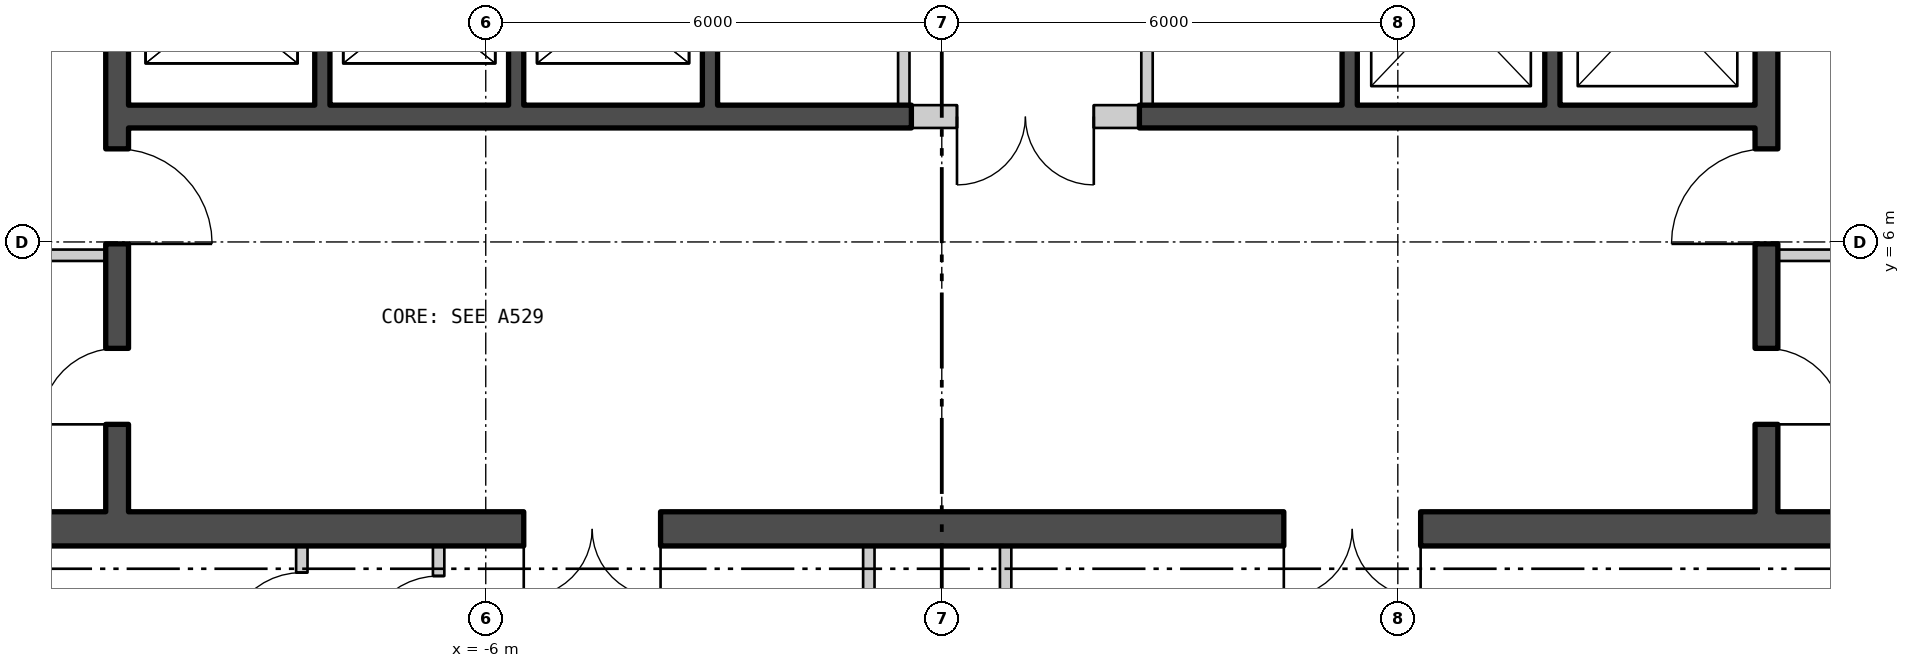
"""IFC4 building model, lengths in metres.
Left out: names, types, materials, properties, quantities, classifications, styles, units other than length and angle.
Written with IfcOpenShell. Run it as: python <this file> out.ifc"""

import sys

from ifc_helpers import new_model, si_unit, direction, frame, frame_2d, origin, place, context, subcontext, project, spatial, polyline, rectangle, outline, extrude, element, fill, save


model = new_model("IFC4")
c1 = context("Model", 3, precision=1e-05, world=origin(), true_north=direction((0.0, 1.0)))
c2 = subcontext(c1, "Body", "Model", "MODEL_VIEW")
j1 = project(units=[si_unit("LENGTHUNIT", "METRE"), si_unit("PLANEANGLEUNIT", "RADIAN")], contexts=[c1])
p1 = place(None, origin())
s1 = spatial("IfcSite", under=j1, at=p1, CompositionType="ELEMENT")
p2 = place(p1, origin())
s2 = spatial("IfcBuilding", under=s1, at=p2, CompositionType="ELEMENT")
p3 = place(p2, frame((0.0, 0.0, 239.4)))
s3 = spatial("IfcBuildingStorey", under=s2, at=p3, CompositionType="ELEMENT", Elevation=239.4)
p4 = place(p3, frame((-25.975, 14.597, -0.18), z_axis=(0.0, 0.0, 1.0), x_axis=(0.499999764979, -0.866025539474, 0.0)))
e1 = element("IfcWall", 1, at=p4, inside=s3, PredefinedType="SOLIDWALL", context=c2, shape_type="SweptSolid", body=[
    extrude(outline(polyline([(-0.13, -0.225), (45.87, -0.225), (45.61, 0.225), (0.13, 0.225), (-0.13, -0.225)])), origin(), (0.0, 0.0, 1.0), 6.0),
])
p5 = place(p4, frame((1.424, 0.0, 1.38)))
e2 = element("IfcOpeningElement", 2, at=p5, cuts=e1, PredefinedType="OPENING", context=c2, shape_type="SweptSolid", body=[
    extrude(rectangle(XDim=2.4, YDim=3.6, at=frame_2d((1.2, 1.8))), frame((0.0, 0.235, 0.0), z_axis=(0.0, -1.0, 0.0), x_axis=(1.0, 0.0, 0.0)), (0.0, 0.0, 1.0), 0.47),
])
p6 = place(p4, frame((5.893, 0.0, 1.38)))
e3 = element("IfcOpeningElement", 3, at=p6, cuts=e1, PredefinedType="OPENING", context=c2, shape_type="SweptSolid", body=[
    extrude(rectangle(XDim=2.4, YDim=3.6, at=frame_2d((1.2, 1.8))), frame((0.0, 0.235, 0.0), z_axis=(0.0, -1.0, 0.0), x_axis=(1.0, 0.0, 0.0)), (0.0, 0.0, 1.0), 0.47),
])
p7 = place(p4, frame((10.401, 0.0, 1.38)))
e4 = element("IfcOpeningElement", 4, at=p7, cuts=e1, PredefinedType="OPENING", context=c2, shape_type="SweptSolid", body=[
    extrude(rectangle(XDim=2.4, YDim=3.6, at=frame_2d((1.2, 1.8))), frame((0.0, 0.235, 0.0), z_axis=(0.0, -1.0, 0.0), x_axis=(1.0, 0.0, 0.0)), (0.0, 0.0, 1.0), 0.47),
])
p8 = place(p4, frame((14.909, 0.0, 1.38)))
e5 = element("IfcOpeningElement", 5, at=p8, cuts=e1, PredefinedType="OPENING", context=c2, shape_type="SweptSolid", body=[
    extrude(rectangle(XDim=2.4, YDim=3.6, at=frame_2d((1.2, 1.8))), frame((0.0, 0.235, 0.0), z_axis=(0.0, -1.0, 0.0), x_axis=(1.0, 0.0, 0.0)), (0.0, 0.0, 1.0), 0.47),
])
p9 = place(p4, frame((19.416, 0.0, 1.38)))
e6 = element("IfcOpeningElement", 6, at=p9, cuts=e1, PredefinedType="OPENING", context=c2, shape_type="SweptSolid", body=[
    extrude(rectangle(XDim=2.4, YDim=3.6, at=frame_2d((1.2, 1.8))), frame((0.0, 0.235, 0.0), z_axis=(0.0, -1.0, 0.0), x_axis=(1.0, 0.0, 0.0)), (0.0, 0.0, 1.0), 0.47),
])
p10 = place(p4, frame((23.924, 0.0, 1.38)))
e7 = element("IfcOpeningElement", 7, at=p10, cuts=e1, PredefinedType="OPENING", context=c2, shape_type="SweptSolid", body=[
    extrude(rectangle(XDim=2.4, YDim=3.6, at=frame_2d((1.2, 1.8))), frame((0.0, 0.235, 0.0), z_axis=(0.0, -1.0, 0.0), x_axis=(1.0, 0.0, 0.0)), (0.0, 0.0, 1.0), 0.47),
])
p11 = place(p4, frame((28.431, 0.0, 1.38)))
e8 = element("IfcOpeningElement", 8, at=p11, cuts=e1, PredefinedType="OPENING", context=c2, shape_type="SweptSolid", body=[
    extrude(rectangle(XDim=2.4, YDim=3.6, at=frame_2d((1.2, 1.8))), frame((0.0, 0.235, 0.0), z_axis=(0.0, -1.0, 0.0), x_axis=(1.0, 0.0, 0.0)), (0.0, 0.0, 1.0), 0.47),
])
p12 = place(p4, frame((32.939, 0.0, 1.38)))
e9 = element("IfcOpeningElement", 9, at=p12, cuts=e1, PredefinedType="OPENING", context=c2, shape_type="SweptSolid", body=[
    extrude(rectangle(XDim=2.4, YDim=3.6, at=frame_2d((1.2, 1.8))), frame((0.0, 0.235, 0.0), z_axis=(0.0, -1.0, 0.0), x_axis=(1.0, 0.0, 0.0)), (0.0, 0.0, 1.0), 0.47),
])
p13 = place(p4, frame((37.447, 0.0, 1.38)))
e10 = element("IfcOpeningElement", 10, at=p13, cuts=e1, PredefinedType="OPENING", context=c2, shape_type="SweptSolid", body=[
    extrude(rectangle(XDim=2.4, YDim=3.6, at=frame_2d((1.2, 1.8))), frame((0.0, 0.235, 0.0), z_axis=(0.0, -1.0, 0.0), x_axis=(1.0, 0.0, 0.0)), (0.0, 0.0, 1.0), 0.47),
])
p14 = place(p4, frame((41.916, 0.0, 1.38)))
e11 = element("IfcOpeningElement", 11, at=p14, cuts=e1, PredefinedType="OPENING", context=c2, shape_type="SweptSolid", body=[
    extrude(rectangle(XDim=2.4, YDim=3.6, at=frame_2d((1.2, 1.8))), frame((0.0, 0.235, 0.0), z_axis=(0.0, -1.0, 0.0), x_axis=(1.0, 0.0, 0.0)), (0.0, 0.0, 1.0), 0.47),
])
p15 = place(p3, frame((3.105, -25.015, -0.18), z_axis=(0.0, 0.0, 1.0), x_axis=(0.499999764979, 0.866025539474, 0.0)))
e12 = element("IfcWall", 12, at=p15, inside=s3, PredefinedType="SOLIDWALL", context=c2, shape_type="SweptSolid", body=[
    extrude(outline(polyline([(-0.13, -0.225), (45.87, -0.225), (45.61, 0.225), (0.13, 0.225), (-0.13, -0.225)])), origin(), (0.0, 0.0, 1.0), 6.0),
])
p16 = place(p15, frame((1.424, 0.0, 1.38)))
e13 = element("IfcOpeningElement", 13, at=p16, cuts=e12, PredefinedType="OPENING", context=c2, shape_type="SweptSolid", body=[
    extrude(rectangle(XDim=2.4, YDim=3.6, at=frame_2d((1.2, 1.8))), frame((0.0, 0.235, 0.0), z_axis=(0.0, -1.0, 0.0), x_axis=(1.0, 0.0, 0.0)), (0.0, 0.0, 1.0), 0.47),
])
p17 = place(p15, frame((5.893, 0.0, 1.38)))
e14 = element("IfcOpeningElement", 14, at=p17, cuts=e12, PredefinedType="OPENING", context=c2, shape_type="SweptSolid", body=[
    extrude(rectangle(XDim=2.4, YDim=3.6, at=frame_2d((1.2, 1.8))), frame((0.0, 0.235, 0.0), z_axis=(0.0, -1.0, 0.0), x_axis=(1.0, 0.0, 0.0)), (0.0, 0.0, 1.0), 0.47),
])
p18 = place(p15, frame((10.401, 0.0, 1.38)))
e15 = element("IfcOpeningElement", 15, at=p18, cuts=e12, PredefinedType="OPENING", context=c2, shape_type="SweptSolid", body=[
    extrude(rectangle(XDim=2.4, YDim=3.6, at=frame_2d((1.2, 1.8))), frame((0.0, 0.235, 0.0), z_axis=(0.0, -1.0, 0.0), x_axis=(1.0, 0.0, 0.0)), (0.0, 0.0, 1.0), 0.47),
])
p19 = place(p15, frame((14.909, 0.0, 1.38)))
e16 = element("IfcOpeningElement", 16, at=p19, cuts=e12, PredefinedType="OPENING", context=c2, shape_type="SweptSolid", body=[
    extrude(rectangle(XDim=2.4, YDim=3.6, at=frame_2d((1.2, 1.8))), frame((0.0, 0.235, 0.0), z_axis=(0.0, -1.0, 0.0), x_axis=(1.0, 0.0, 0.0)), (0.0, 0.0, 1.0), 0.47),
])
p20 = place(p15, frame((19.416, 0.0, 1.38)))
e17 = element("IfcOpeningElement", 17, at=p20, cuts=e12, PredefinedType="OPENING", context=c2, shape_type="SweptSolid", body=[
    extrude(rectangle(XDim=2.4, YDim=3.6, at=frame_2d((1.2, 1.8))), frame((0.0, 0.235, 0.0), z_axis=(0.0, -1.0, 0.0), x_axis=(1.0, 0.0, 0.0)), (0.0, 0.0, 1.0), 0.47),
])
p21 = place(p15, frame((23.924, 0.0, 1.38)))
e18 = element("IfcOpeningElement", 18, at=p21, cuts=e12, PredefinedType="OPENING", context=c2, shape_type="SweptSolid", body=[
    extrude(rectangle(XDim=2.4, YDim=3.6, at=frame_2d((1.2, 1.8))), frame((0.0, 0.235, 0.0), z_axis=(0.0, -1.0, 0.0), x_axis=(1.0, 0.0, 0.0)), (0.0, 0.0, 1.0), 0.47),
])
p22 = place(p15, frame((28.431, 0.0, 1.38)))
e19 = element("IfcOpeningElement", 19, at=p22, cuts=e12, PredefinedType="OPENING", context=c2, shape_type="SweptSolid", body=[
    extrude(rectangle(XDim=2.4, YDim=3.6, at=frame_2d((1.2, 1.8))), frame((0.0, 0.235, 0.0), z_axis=(0.0, -1.0, 0.0), x_axis=(1.0, 0.0, 0.0)), (0.0, 0.0, 1.0), 0.47),
])
p23 = place(p15, frame((32.939, 0.0, 1.38)))
e20 = element("IfcOpeningElement", 20, at=p23, cuts=e12, PredefinedType="OPENING", context=c2, shape_type="SweptSolid", body=[
    extrude(rectangle(XDim=2.4, YDim=3.6, at=frame_2d((1.2, 1.8))), frame((0.0, 0.235, 0.0), z_axis=(0.0, -1.0, 0.0), x_axis=(1.0, 0.0, 0.0)), (0.0, 0.0, 1.0), 0.47),
])
p24 = place(p15, frame((37.447, 0.0, 1.38)))
e21 = element("IfcOpeningElement", 21, at=p24, cuts=e12, PredefinedType="OPENING", context=c2, shape_type="SweptSolid", body=[
    extrude(rectangle(XDim=2.4, YDim=3.6, at=frame_2d((1.2, 1.8))), frame((0.0, 0.235, 0.0), z_axis=(0.0, -1.0, 0.0), x_axis=(1.0, 0.0, 0.0)), (0.0, 0.0, 1.0), 0.47),
])
p25 = place(p15, frame((41.916, 0.0, 1.38)))
e22 = element("IfcOpeningElement", 22, at=p25, cuts=e12, PredefinedType="OPENING", context=c2, shape_type="SweptSolid", body=[
    extrude(rectangle(XDim=2.4, YDim=3.6, at=frame_2d((1.2, 1.8))), frame((0.0, 0.235, 0.0), z_axis=(0.0, -1.0, 0.0), x_axis=(1.0, 0.0, 0.0)), (0.0, 0.0, 1.0), 0.47),
])
p26 = place(p3, frame((-16.2, 2.225, 0.0), z_axis=(0.0, 0.0, 1.0), x_axis=(1.0, 0.0, 0.0)))
e23 = element("IfcWall", 23, at=p26, inside=s3, PredefinedType="SHEAR", context=c2, shape_type="SweptSolid", body=[
    extrude(rectangle(XDim=32.4, YDim=0.45, at=frame_2d((16.2, 0.0))), origin(), (0.0, 0.0, 1.0), 5.8),
])
p27 = place(p26, frame((10.7, 0.0, 0.0)))
e24 = element("IfcOpeningElement", 24, at=p27, cuts=e23, PredefinedType="OPENING", context=c2, shape_type="SweptSolid", body=[
    extrude(rectangle(XDim=1.8, YDim=2.4, at=frame_2d((0.9, 1.2))), frame((0.0, 0.235, 0.0), z_axis=(0.0, -1.0, 0.0), x_axis=(1.0, 0.0, 0.0)), (0.0, 0.0, 1.0), 0.47),
])
p28 = place(p26, frame((20.7, 0.0, 0.0)))
e25 = element("IfcOpeningElement", 25, at=p28, cuts=e23, PredefinedType="OPENING", context=c2, shape_type="SweptSolid", body=[
    extrude(rectangle(XDim=1.8, YDim=2.4, at=frame_2d((0.9, 1.2))), frame((0.0, 0.235, 0.0), z_axis=(0.0, -1.0, 0.0), x_axis=(1.0, 0.0, 0.0)), (0.0, 0.0, 1.0), 0.47),
])
p29 = place(p3, frame((-10.85, 2.45, 0.0), z_axis=(0.0, 0.0, 1.0), x_axis=(0.0, 1.0, 0.0)))
e26 = element("IfcWall", 26, at=p29, inside=s3, PredefinedType="SHEAR", context=c2, shape_type="SweptSolid", body=[
    extrude(rectangle(XDim=15.1, YDim=0.3, at=frame_2d((7.55, 0.0))), origin(), (0.0, 0.0, 1.0), 5.8),
])
p30 = place(p29, frame((3.525, 0.0, 0.0)))
e27 = element("IfcOpeningElement", 27, at=p30, cuts=e26, PredefinedType="OPENING", context=c2, shape_type="SweptSolid", body=[
    extrude(rectangle(XDim=1.25, YDim=2.1, at=frame_2d((0.625, 1.05))), frame((0.0, 0.16, 0.0), z_axis=(0.0, -1.0, 0.0), x_axis=(1.0, 0.0, 0.0)), (0.0, 0.0, 1.0), 0.32),
])
p31 = place(p29, frame((1.15, 0.0, 0.0)))
e28 = element("IfcOpeningElement", 28, at=p31, cuts=e26, PredefinedType="OPENING", context=c2, shape_type="SweptSolid", body=[
    extrude(rectangle(XDim=1.0, YDim=2.1, at=frame_2d((0.5, 1.05))), frame((0.0, 0.16, 0.0), z_axis=(0.0, -1.0, 0.0), x_axis=(1.0, 0.0, 0.0)), (0.0, 0.0, 1.0), 0.32),
])
p32 = place(p3, frame((10.85, 2.45, 0.0), z_axis=(0.0, 0.0, 1.0), x_axis=(0.0, 1.0, 0.0)))
e29 = element("IfcWall", 29, at=p32, inside=s3, PredefinedType="SHEAR", context=c2, shape_type="SweptSolid", body=[
    extrude(rectangle(XDim=15.1, YDim=0.3, at=frame_2d((7.55, 0.0))), origin(), (0.0, 0.0, 1.0), 5.8),
])
p33 = place(p32, frame((3.525, 0.0, 0.0)))
e30 = element("IfcOpeningElement", 30, at=p33, cuts=e29, PredefinedType="OPENING", context=c2, shape_type="SweptSolid", body=[
    extrude(rectangle(XDim=1.25, YDim=2.1, at=frame_2d((0.625, 1.05))), frame((0.0, 0.16, 0.0), z_axis=(0.0, -1.0, 0.0), x_axis=(1.0, 0.0, 0.0)), (0.0, 0.0, 1.0), 0.32),
])
p34 = place(p32, frame((1.15, 0.0, 0.0)))
e31 = element("IfcOpeningElement", 31, at=p34, cuts=e29, PredefinedType="OPENING", context=c2, shape_type="SweptSolid", body=[
    extrude(rectangle(XDim=1.0, YDim=2.1, at=frame_2d((0.5, 1.05))), frame((0.0, 0.16, 0.0), z_axis=(0.0, -1.0, 0.0), x_axis=(1.0, 0.0, 0.0)), (0.0, 0.0, 1.0), 0.32),
])
p35 = place(p3, frame((-10.7, 7.65, 0.0), z_axis=(0.0, 0.0, 1.0), x_axis=(1.0, 0.0, 0.0)))
e32 = element("IfcWall", 32, at=p35, inside=s3, PredefinedType="SHEAR", context=c2, shape_type="SweptSolid", body=[
    extrude(rectangle(XDim=10.3, YDim=0.3, at=frame_2d((5.15, 0.0))), origin(), (0.0, 0.0, 1.0), 5.8),
])
p36 = place(p3, frame((2.6, 7.65, 0.0), z_axis=(0.0, 0.0, 1.0), x_axis=(1.0, 0.0, 0.0)))
e33 = element("IfcWall", 33, at=p36, inside=s3, PredefinedType="SHEAR", context=c2, shape_type="SweptSolid", body=[
    extrude(rectangle(XDim=8.1, YDim=0.3, at=frame_2d((4.05, 0.0))), origin(), (0.0, 0.0, 1.0), 5.8),
])
for number, where, z_axis, x_axis in (
    (34, (-8.15, 7.8, 0.0), (0.0, 0.0, 1.0), (0.0, 1.0, 0.0)),
    (35, (-5.6, 7.8, 0.0), (0.0, 0.0, 1.0), (0.0, 1.0, 0.0)),
    (36, (-3.05, 7.8, 0.0), (0.0, 0.0, 1.0), (0.0, 1.0, 0.0)),
):
    element("IfcWall", number, at=place(p3, frame(where, z_axis=z_axis, x_axis=x_axis)), inside=s3, PredefinedType="SHEAR", context=c2, shape_type="SweptSolid", body=[
        extrude(rectangle(XDim=2.7, YDim=0.2, at=frame_2d((1.35, 0.0))), origin(), (0.0, 0.0, 1.0), 5.8),
    ])
for number, where, z_axis, x_axis in (
    (37, (-0.5, 7.8, 0.0), (0.0, 0.0, 1.0), (0.0, 1.0, 0.0)),
    (38, (2.7, 7.8, 0.0), (0.0, 0.0, 1.0), (0.0, 1.0, 0.0)),
):
    element("IfcWall", number, at=place(p3, frame(where, z_axis=z_axis, x_axis=x_axis)), inside=s3, PredefinedType="PARTITIONING", context=c2, shape_type="SweptSolid", body=[
        extrude(rectangle(XDim=2.7, YDim=0.15, at=frame_2d((1.35, 0.0))), origin(), (0.0, 0.0, 1.0), 5.8),
    ])
for number, where, z_axis, x_axis in (
    (39, (5.367, 7.8, 0.0), (0.0, 0.0, 1.0), (0.0, 1.0, 0.0)),
    (40, (8.033, 7.8, 0.0), (0.0, 0.0, 1.0), (0.0, 1.0, 0.0)),
):
    element("IfcWall", number, at=place(p3, frame(where, z_axis=z_axis, x_axis=x_axis)), inside=s3, PredefinedType="SHEAR", context=c2, shape_type="SweptSolid", body=[
        extrude(rectangle(XDim=2.7, YDim=0.2, at=frame_2d((1.35, 0.0))), origin(), (0.0, 0.0, 1.0), 5.8),
    ])
for number, where, z_axis, x_axis in (
    (41, (-14.2, 5.825, 0.0), (0.0, 0.0, 1.0), (1.0, 0.0, 0.0)),
    (42, (11.0, 5.825, 0.0), (0.0, 0.0, 1.0), (1.0, 0.0, 0.0)),
):
    element("IfcWall", number, at=place(p3, frame(where, z_axis=z_axis, x_axis=x_axis)), inside=s3, PredefinedType="PARTITIONING", context=c2, shape_type="SweptSolid", body=[
        extrude(rectangle(XDim=3.2, YDim=0.15, at=frame_2d((1.6, 0.0))), origin(), (0.0, 0.0, 1.0), 5.8),
    ])
p37 = place(p3, frame((-0.4, 7.65, 0.0), z_axis=(0.0, 0.0, 1.0), x_axis=(1.0, 0.0, 0.0)))
e43 = element("IfcWall", 43, at=p37, inside=s3, PredefinedType="PARTITIONING", context=c2, shape_type="SweptSolid", body=[
    extrude(rectangle(XDim=3.0, YDim=0.3, at=frame_2d((1.5, 0.0))), origin(), (0.0, 0.0, 1.0), 5.8),
])
p38 = place(p37, frame((0.6, 0.0, 0.0)))
e44 = element("IfcOpeningElement", 44, at=p38, cuts=e43, PredefinedType="OPENING", context=c2, shape_type="SweptSolid", body=[
    extrude(rectangle(XDim=1.8, YDim=2.4, at=frame_2d((0.9, 1.2))), frame((0.0, 0.16, 0.0), z_axis=(0.0, -1.0, 0.0), x_axis=(1.0, 0.0, 0.0)), (0.0, 0.0, 1.0), 0.32),
])
p39 = place(p3, frame((-8.42, 0.3, 0.0), z_axis=(0.0, 0.0, 1.0), x_axis=(0.0, 1.0, 0.0)))
e45 = element("IfcWall", 45, at=p39, inside=s3, PredefinedType="PARTITIONING", context=c2, shape_type="SweptSolid", body=[
    extrude(rectangle(XDim=1.7, YDim=0.15, at=frame_2d((0.85, 0.0))), origin(), (0.0, 0.0, 1.0), 5.8),
])
p40 = place(p39, frame((0.35, 0.0, 0.0)))
e46 = element("IfcOpeningElement", 46, at=p40, cuts=e45, PredefinedType="OPENING", context=c2, shape_type="SweptSolid", body=[
    extrude(rectangle(XDim=1.0, YDim=2.1, at=frame_2d((0.5, 1.05))), frame((0.0, 0.085, 0.0), z_axis=(0.0, -1.0, 0.0), x_axis=(1.0, 0.0, 0.0)), (0.0, 0.0, 1.0), 0.17),
])
p41 = place(p3, frame((-6.62, 0.211, 0.0), z_axis=(0.0, 0.0, 1.0), x_axis=(0.0, 1.0, 0.0)))
e47 = element("IfcWall", 47, at=p41, inside=s3, PredefinedType="PARTITIONING", context=c2, shape_type="SweptSolid", body=[
    extrude(rectangle(XDim=1.789, YDim=0.15, at=frame_2d((0.894, 0.0))), origin(), (0.0, 0.0, 1.0), 5.8),
])
p42 = place(p41, frame((0.394, 0.0, 0.0)))
e48 = element("IfcOpeningElement", 48, at=p42, cuts=e47, PredefinedType="OPENING", context=c2, shape_type="SweptSolid", body=[
    extrude(rectangle(XDim=1.0, YDim=2.1, at=frame_2d((0.5, 1.05))), frame((0.0, 0.085, 0.0), z_axis=(0.0, -1.0, 0.0), x_axis=(1.0, 0.0, 0.0)), (0.0, 0.0, 1.0), 0.17),
])
p43 = place(p3, frame((-0.96, -1.125, 0.0), z_axis=(0.0, 0.0, 1.0), x_axis=(0.0, 1.0, 0.0)))
e49 = element("IfcWall", 49, at=p43, inside=s3, PredefinedType="PARTITIONING", context=c2, shape_type="SweptSolid", body=[
    extrude(rectangle(XDim=3.125, YDim=0.15, at=frame_2d((1.562, 0.0))), origin(), (0.0, 0.0, 1.0), 5.8),
])
p44 = place(p43, frame((1.062, 0.0, 0.0)))
e50 = element("IfcOpeningElement", 50, at=p44, cuts=e49, PredefinedType="OPENING", context=c2, shape_type="SweptSolid", body=[
    extrude(rectangle(XDim=1.0, YDim=2.1, at=frame_2d((0.5, 1.05))), frame((0.0, 0.085, 0.0), z_axis=(0.0, -1.0, 0.0), x_axis=(1.0, 0.0, 0.0)), (0.0, 0.0, 1.0), 0.17),
])
p45 = place(p3, frame((0.84, -1.1, 0.0), z_axis=(0.0, 0.0, 1.0), x_axis=(0.0, 1.0, 0.0)))
e51 = element("IfcWall", 51, at=p45, inside=s3, PredefinedType="PARTITIONING", context=c2, shape_type="SweptSolid", body=[
    extrude(rectangle(XDim=3.1, YDim=0.15, at=frame_2d((1.55, 0.0))), origin(), (0.0, 0.0, 1.0), 5.8),
])
p46 = place(p45, frame((1.05, 0.0, 0.0)))
e52 = element("IfcOpeningElement", 52, at=p46, cuts=e51, PredefinedType="OPENING", context=c2, shape_type="SweptSolid", body=[
    extrude(rectangle(XDim=1.0, YDim=2.1, at=frame_2d((0.5, 1.05))), frame((0.0, 0.085, 0.0), z_axis=(0.0, -1.0, 0.0), x_axis=(1.0, 0.0, 0.0)), (0.0, 0.0, 1.0), 0.17),
])
p47 = place(p30, origin())
e53 = element("IfcDoor", 53, at=p47, inside=s3, OperationType="SINGLE_SWING_LEFT", PredefinedType="DOOR", context=c2, shape_type="SweptSolid", body=[
    extrude(rectangle(XDim=1.25, YDim=2.1, at=frame_2d((0.625, 1.05))), frame((0.0, 0.025, 0.0), z_axis=(0.0, -1.0, 0.0), x_axis=(1.0, 0.0, 0.0)), (0.0, 0.0, 1.0), 0.05),
])
fill(e27, e53)
p48 = place(p31, origin())
e54 = element("IfcDoor", 54, at=p48, inside=s3, OperationType="SINGLE_SWING_RIGHT", PredefinedType="DOOR", context=c2, shape_type="SweptSolid", body=[
    extrude(rectangle(XDim=1.0, YDim=2.1, at=frame_2d((0.5, 1.05))), frame((0.0, 0.025, 0.0), z_axis=(0.0, -1.0, 0.0), x_axis=(1.0, 0.0, 0.0)), (0.0, 0.0, 1.0), 0.05),
])
fill(e28, e54)
p49 = place(p33, origin())
e55 = element("IfcDoor", 55, at=p49, inside=s3, OperationType="SINGLE_SWING_RIGHT", PredefinedType="DOOR", context=c2, shape_type="SweptSolid", body=[
    extrude(rectangle(XDim=1.25, YDim=2.1, at=frame_2d((0.625, 1.05))), frame((0.0, 0.025, 0.0), z_axis=(0.0, -1.0, 0.0), x_axis=(1.0, 0.0, 0.0)), (0.0, 0.0, 1.0), 0.05),
])
fill(e30, e55)
p50 = place(p34, origin())
e56 = element("IfcDoor", 56, at=p50, inside=s3, OperationType="SINGLE_SWING_LEFT", PredefinedType="DOOR", context=c2, shape_type="SweptSolid", body=[
    extrude(rectangle(XDim=1.0, YDim=2.1, at=frame_2d((0.5, 1.05))), frame((0.0, 0.025, 0.0), z_axis=(0.0, -1.0, 0.0), x_axis=(1.0, 0.0, 0.0)), (0.0, 0.0, 1.0), 0.05),
])
fill(e31, e56)
p51 = place(p38, origin())
e57 = element("IfcDoor", 57, at=p51, inside=s3, OperationType="DOUBLE_DOOR_SINGLE_SWING", PredefinedType="DOOR", context=c2, shape_type="SweptSolid", body=[
    extrude(rectangle(XDim=1.8, YDim=2.4, at=frame_2d((0.9, 1.2))), frame((0.0, 0.025, 0.0), z_axis=(0.0, -1.0, 0.0), x_axis=(1.0, 0.0, 0.0)), (0.0, 0.0, 1.0), 0.05),
])
fill(e44, e57)
p52 = place(p27, origin())
e58 = element("IfcDoor", 58, at=p52, inside=s3, OperationType="DOUBLE_DOOR_SINGLE_SWING", PredefinedType="DOOR", context=c2, shape_type="SweptSolid", body=[
    extrude(rectangle(XDim=1.8, YDim=2.4, at=frame_2d((0.9, 1.2))), frame((0.0, 0.025, 0.0), z_axis=(0.0, -1.0, 0.0), x_axis=(1.0, 0.0, 0.0)), (0.0, 0.0, 1.0), 0.05),
])
fill(e24, e58)
p53 = place(p28, origin())
e59 = element("IfcDoor", 59, at=p53, inside=s3, OperationType="DOUBLE_DOOR_SINGLE_SWING", PredefinedType="DOOR", context=c2, shape_type="SweptSolid", body=[
    extrude(rectangle(XDim=1.8, YDim=2.4, at=frame_2d((0.9, 1.2))), frame((0.0, 0.025, 0.0), z_axis=(0.0, -1.0, 0.0), x_axis=(1.0, 0.0, 0.0)), (0.0, 0.0, 1.0), 0.05),
])
fill(e25, e59)
p54 = place(p40, origin())
e60 = element("IfcDoor", 60, at=p54, inside=s3, OperationType="SINGLE_SWING_RIGHT", PredefinedType="DOOR", context=c2, shape_type="SweptSolid", body=[
    extrude(rectangle(XDim=1.0, YDim=2.1, at=frame_2d((0.5, 1.05))), frame((0.0, 0.025, 0.0), z_axis=(0.0, -1.0, 0.0), x_axis=(1.0, 0.0, 0.0)), (0.0, 0.0, 1.0), 0.05),
])
fill(e46, e60)
p55 = place(p42, origin())
e61 = element("IfcDoor", 61, at=p55, inside=s3, OperationType="SINGLE_SWING_RIGHT", PredefinedType="DOOR", context=c2, shape_type="SweptSolid", body=[
    extrude(rectangle(XDim=1.0, YDim=2.1, at=frame_2d((0.5, 1.05))), frame((0.0, 0.025, 0.0), z_axis=(0.0, -1.0, 0.0), x_axis=(1.0, 0.0, 0.0)), (0.0, 0.0, 1.0), 0.05),
])
fill(e48, e61)
save(model, sys.argv[1])
